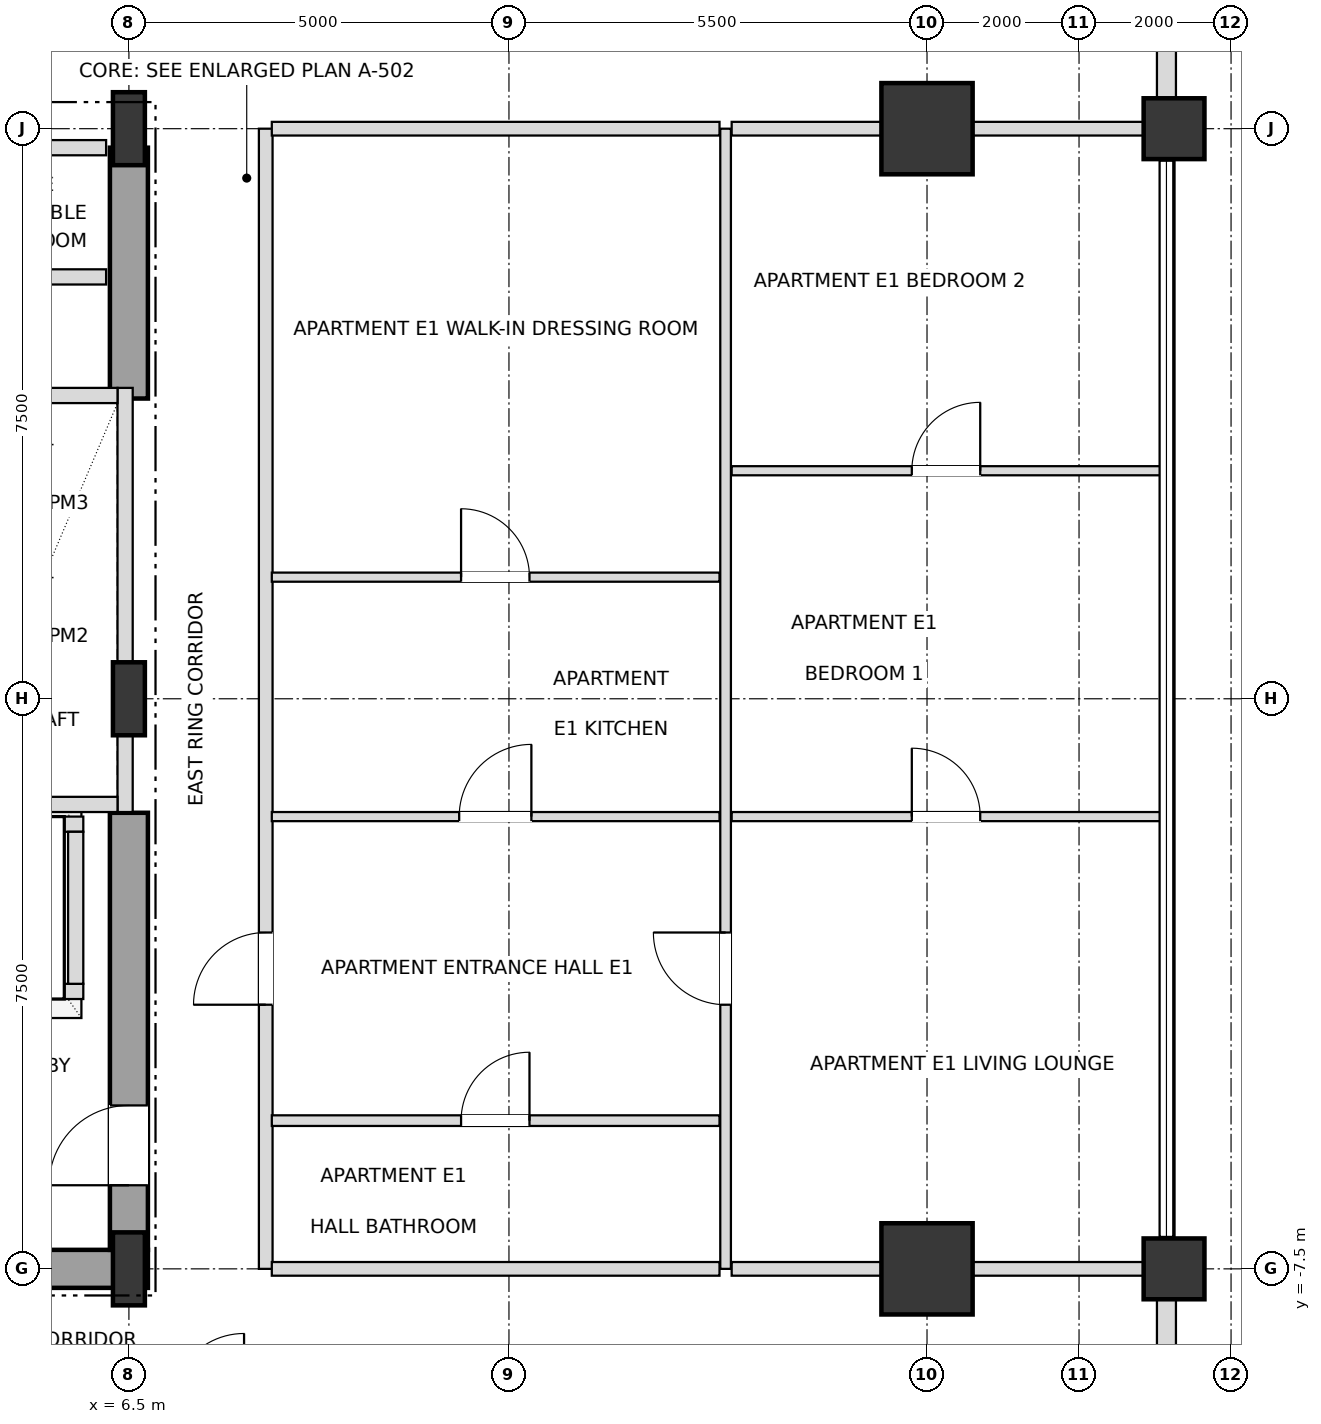
"""IFC4 building model, lengths in metres.
Left out: names, types, materials, properties, quantities, classifications, styles, units other than length and angle.
Written with IfcOpenShell. Run it as: python <this file> out.ifc"""

import sys

from ifc_helpers import new_model, si_unit, direction, frame, frame_2d, origin, origin_2d, place, context, subcontext, project, spatial, rectangle, i_section, extrude, element, fill, save


model = new_model("IFC4")
c1 = context("Model", 3, precision=1e-05, world=origin(), true_north=direction((0.0, 1.0)))
c2 = subcontext(c1, "Body", "Model", "MODEL_VIEW")
j1 = project(units=[si_unit("LENGTHUNIT", "METRE"), si_unit("PLANEANGLEUNIT", "RADIAN")], contexts=[c1])
p1 = place(None, origin())
s1 = spatial("IfcSite", under=j1, at=p1, CompositionType="ELEMENT")
p2 = place(p1, origin())
s2 = spatial("IfcBuilding", under=s1, at=p2, CompositionType="ELEMENT")
p3 = place(p2, frame((0.0, 0.0, 102.6)))
s3 = spatial("IfcBuildingStorey", under=s2, at=p3, CompositionType="ELEMENT", Elevation=102.6)
for number, where, z_axis, x_axis in (
    (1, (6.5, -7.5, 0.0), (0.0, 0.0, 1.0), (1.0, 0.0, 0.0)),
    (2, (6.5, 0.0, 0.0), (0.0, 0.0, 1.0), (1.0, 0.0, 0.0)),
    (3, (6.5, 7.5, 0.0), (0.0, 0.0, 1.0), (1.0, 0.0, 0.0)),
):
    element("IfcColumn", number, at=place(p3, frame(where, z_axis=z_axis, x_axis=x_axis)), inside=s3, PredefinedType="COLUMN", context=c2, shape_type="SweptSolid", body=[
        extrude(i_section(OverallWidth=0.42, OverallDepth=0.96, WebThickness=0.022, FlangeThickness=0.034, at=origin_2d()), origin(), (0.0, 0.0, 1.0), 3.6),
    ])
for number, where, z_axis, x_axis in (
    (4, (17.0, -7.5, 0.0), (0.0, 0.0, 1.0), (1.0, 0.0, 0.0)),
    (5, (17.0, 7.5, 0.0), (0.0, 0.0, 1.0), (1.0, 0.0, 0.0)),
):
    element("IfcColumn", number, at=place(p3, frame(where, z_axis=z_axis, x_axis=x_axis)), inside=s3, PredefinedType="USERDEFINED", context=c2, shape_type="SweptSolid", body=[
        extrude(rectangle(XDim=1.2, YDim=1.2, at=origin_2d()), origin(), (0.0, 0.0, 1.0), 3.6),
    ])
for number, where, z_axis, x_axis in (
    (6, (20.25, -7.5, 0.0), (0.0, 0.0, 1.0), (1.0, 0.0, 0.0)),
    (7, (20.25, 7.5, 0.0), (0.0, 0.0, 1.0), (1.0, 0.0, 0.0)),
):
    element("IfcColumn", number, at=place(p3, frame(where, z_axis=z_axis, x_axis=x_axis)), inside=s3, PredefinedType="COLUMN", context=c2, shape_type="SweptSolid", body=[
        extrude(rectangle(XDim=0.8, YDim=0.8, at=origin_2d()), origin(), (0.0, 0.0, 1.0), 3.6),
    ])
p4 = place(p3, frame((20.15, -12.605, 0.0), z_axis=(0.0, 0.0, 1.0), x_axis=(0.0, 1.0, 0.0)))
e8 = element("IfcWall", 8, at=p4, inside=s3, PredefinedType="SOLIDWALL", context=c2, shape_type="SweptSolid", body=[
    extrude(rectangle(XDim=4.71, YDim=0.25, at=frame_2d((2.355, 0.0))), origin(), (0.0, 0.0, 1.0), 2.736),
])
p5 = place(p4, frame((1.455, 0.0, 0.72)))
e9 = element("IfcOpeningElement", 9, at=p5, cuts=e8, PredefinedType="OPENING", context=c2, shape_type="SweptSolid", body=[
    extrude(rectangle(XDim=1.8, YDim=1.68, at=frame_2d((0.9, 0.84))), frame((0.0, 0.135, 0.0), z_axis=(0.0, -1.0, 0.0), x_axis=(1.0, 0.0, 0.0)), (0.0, 0.0, 1.0), 0.27),
])
p6 = place(p3, frame((20.15, 7.895, 0.0), z_axis=(0.0, 0.0, 1.0), x_axis=(0.0, 1.0, 0.0)))
e10 = element("IfcWall", 10, at=p6, inside=s3, PredefinedType="SOLIDWALL", context=c2, shape_type="SweptSolid", body=[
    extrude(rectangle(XDim=4.71, YDim=0.25, at=frame_2d((2.355, 0.0))), origin(), (0.0, 0.0, 1.0), 2.736),
])
p7 = place(p6, frame((1.455, 0.0, 0.72)))
e11 = element("IfcOpeningElement", 11, at=p7, cuts=e10, PredefinedType="OPENING", context=c2, shape_type="SweptSolid", body=[
    extrude(rectangle(XDim=1.8, YDim=1.68, at=frame_2d((0.9, 0.84))), frame((0.0, 0.135, 0.0), z_axis=(0.0, -1.0, 0.0), x_axis=(1.0, 0.0, 0.0)), (0.0, 0.0, 1.0), 0.27),
])
p8 = place(p3, frame((0.0, -7.5, 0.0), z_axis=(0.0, 0.0, 1.0), x_axis=(1.0, 0.0, 0.0)))
e12 = element("IfcWall", 12, at=p8, inside=s3, PredefinedType="SHEAR", context=c2, shape_type="SweptSolid", body=[
    extrude(rectangle(XDim=6.75, YDim=0.5, at=frame_2d((3.375, 0.0))), origin(), (0.0, 0.0, 1.0), 3.38),
])
p9 = place(p3, frame((6.5, -7.25, 0.0), z_axis=(0.0, 0.0, 1.0), x_axis=(0.0, 1.0, 0.0)))
e13 = element("IfcWall", 13, at=p9, inside=s3, PredefinedType="SHEAR", context=c2, shape_type="SweptSolid", body=[
    extrude(rectangle(XDim=5.75, YDim=0.5, at=frame_2d((2.875, 0.0))), origin(), (0.0, 0.0, 1.0), 3.38),
])
p10 = place(p9, frame((0.85, 0.0, 0.0)))
e14 = element("IfcOpeningElement", 14, at=p10, cuts=e13, PredefinedType="OPENING", context=c2, shape_type="SweptSolid", body=[
    extrude(rectangle(XDim=1.05, YDim=2.15, at=frame_2d((0.525, 1.075))), frame((0.0, 0.26, 0.0), z_axis=(0.0, -1.0, 0.0), x_axis=(1.0, 0.0, 0.0)), (0.0, 0.0, 1.0), 0.52),
])
p11 = place(p3, frame((6.5, 3.95, 0.0), z_axis=(0.0, 0.0, 1.0), x_axis=(0.0, 1.0, 0.0)))
e15 = element("IfcWall", 15, at=p11, inside=s3, PredefinedType="SHEAR", context=c2, shape_type="SweptSolid", body=[
    extrude(rectangle(XDim=3.3, YDim=0.5, at=frame_2d((1.65, 0.0))), origin(), (0.0, 0.0, 1.0), 3.38),
])
p12 = place(p3, frame((6.45, -1.49, 0.0), z_axis=(0.0, 0.0, 1.0), x_axis=(0.0, 1.0, 0.0)))
e16 = element("IfcWall", 16, at=p12, inside=s3, PredefinedType="SOLIDWALL", context=c2, shape_type="SweptSolid", body=[
    extrude(rectangle(XDim=5.58, YDim=0.2, at=frame_2d((2.79, 0.0))), origin(), (0.0, 0.0, 1.0), 2.816),
])
for number, where, z_axis, x_axis in (
    (17, (4.15, -1.39, 0.0), (0.0, 0.0, 1.0), (1.0, 0.0, 0.0)),
    (18, (4.15, 3.99, 0.0), (0.0, 0.0, 1.0), (1.0, 0.0, 0.0)),
):
    element("IfcWall", number, at=place(p3, frame(where, z_axis=z_axis, x_axis=x_axis)), inside=s3, PredefinedType="SOLIDWALL", context=c2, shape_type="SweptSolid", body=[
        extrude(rectangle(XDim=2.2, YDim=0.2, at=frame_2d((1.1, 0.0))), origin(), (0.0, 0.0, 1.0), 3.38),
    ])
p13 = place(p3, frame((1.8, -3.85, 0.0), z_axis=(0.0, 0.0, 1.0), x_axis=(1.0, 0.0, 0.0)))
e19 = element("IfcWall", 19, at=p13, inside=s3, PredefinedType="SOLIDWALL", context=c2, shape_type="SweptSolid", body=[
    extrude(rectangle(XDim=4.1, YDim=0.2, at=frame_2d((2.05, 0.0))), origin(), (0.0, 0.0, 1.0), 3.38),
])
p14 = place(p13, frame((0.45, 0.0, 0.0)))
e20 = element("IfcOpeningElement", 20, at=p14, cuts=e19, PredefinedType="OPENING", context=c2, shape_type="SweptSolid", body=[
    extrude(rectangle(XDim=1.2, YDim=2.2, at=frame_2d((0.6, 1.1))), frame((0.0, 0.11, 0.0), z_axis=(0.0, -1.0, 0.0), x_axis=(1.0, 0.0, 0.0)), (0.0, 0.0, 1.0), 0.22),
])
p15 = place(p13, frame((2.45, 0.0, 0.0)))
e21 = element("IfcOpeningElement", 21, at=p15, cuts=e19, PredefinedType="OPENING", context=c2, shape_type="SweptSolid", body=[
    extrude(rectangle(XDim=1.2, YDim=2.2, at=frame_2d((0.6, 1.1))), frame((0.0, 0.11, 0.0), z_axis=(0.0, -1.0, 0.0), x_axis=(1.0, 0.0, 0.0)), (0.0, 0.0, 1.0), 0.22),
])
p16 = place(p3, frame((1.8, -1.65, 0.0), z_axis=(0.0, 0.0, 1.0), x_axis=(1.0, 0.0, 0.0)))
e22 = element("IfcWall", 22, at=p16, inside=s3, PredefinedType="SOLIDWALL", context=c2, shape_type="SweptSolid", body=[
    extrude(rectangle(XDim=4.1, YDim=0.2, at=frame_2d((2.05, 0.0))), origin(), (0.0, 0.0, 1.0), 3.38),
])
p17 = place(p3, frame((5.8, -3.75, 0.0), z_axis=(0.0, 0.0, 1.0), x_axis=(0.0, 1.0, 0.0)))
e23 = element("IfcWall", 23, at=p17, inside=s3, PredefinedType="SOLIDWALL", context=c2, shape_type="SweptSolid", body=[
    extrude(rectangle(XDim=2.0, YDim=0.2, at=frame_2d((1.0, 0.0))), origin(), (0.0, 0.0, 1.0), 3.38),
])
p18 = place(p3, frame((8.3, -7.5, 0.0), z_axis=(0.0, 0.0, 1.0), x_axis=(0.0, 1.0, 0.0)))
e24 = element("IfcWall", 24, at=p18, inside=s3, PredefinedType="PARTITIONING", context=c2, shape_type="SweptSolid", body=[
    extrude(rectangle(XDim=15.0, YDim=0.18, at=frame_2d((7.5, 0.0))), origin(), (0.0, 0.0, 1.0), 3.38),
])
p19 = place(p18, frame((3.475, 0.0, 0.0)))
e25 = element("IfcOpeningElement", 25, at=p19, cuts=e24, PredefinedType="OPENING", context=c2, shape_type="SweptSolid", body=[
    extrude(rectangle(XDim=0.95, YDim=2.15, at=frame_2d((0.475, 1.075))), frame((0.0, 0.1, 0.0), z_axis=(0.0, -1.0, 0.0), x_axis=(1.0, 0.0, 0.0)), (0.0, 0.0, 1.0), 0.2),
])
p20 = place(p3, frame((14.35, -7.5, 0.0), z_axis=(0.0, 0.0, 1.0), x_axis=(0.0, 1.0, 0.0)))
e26 = element("IfcWall", 26, at=p20, inside=s3, PredefinedType="PARTITIONING", context=c2, shape_type="SweptSolid", body=[
    extrude(rectangle(XDim=15.0, YDim=0.14, at=frame_2d((7.5, 0.0))), origin(), (0.0, 0.0, 1.0), 3.38),
])
p21 = place(p20, frame((3.475, 0.0, 0.0)))
e27 = element("IfcOpeningElement", 27, at=p21, cuts=e26, PredefinedType="OPENING", context=c2, shape_type="SweptSolid", body=[
    extrude(rectangle(XDim=0.95, YDim=2.1, at=frame_2d((0.475, 1.05))), frame((0.0, 0.08, 0.0), z_axis=(0.0, -1.0, 0.0), x_axis=(1.0, 0.0, 0.0)), (0.0, 0.0, 1.0), 0.16),
])
p22 = place(p3, frame((8.38, -7.5, 0.0), z_axis=(0.0, 0.0, 1.0), x_axis=(1.0, 0.0, 0.0)))
e28 = element("IfcWall", 28, at=p22, inside=s3, PredefinedType="PARTITIONING", context=c2, shape_type="SweptSolid", body=[
    extrude(rectangle(XDim=5.89, YDim=0.18, at=frame_2d((2.945, 0.0))), origin(), (0.0, 0.0, 1.0), 2.816),
])
p23 = place(p3, frame((14.43, -7.5, 0.0), z_axis=(0.0, 0.0, 1.0), x_axis=(1.0, 0.0, 0.0)))
e29 = element("IfcWall", 29, at=p23, inside=s3, PredefinedType="PARTITIONING", context=c2, shape_type="SweptSolid", body=[
    extrude(rectangle(XDim=5.72, YDim=0.18, at=frame_2d((2.86, 0.0))), origin(), (0.0, 0.0, 1.0), 2.816),
])
p24 = place(p3, frame((8.38, -5.55, 0.0), z_axis=(0.0, 0.0, 1.0), x_axis=(1.0, 0.0, 0.0)))
e30 = element("IfcWall", 30, at=p24, inside=s3, PredefinedType="PARTITIONING", context=c2, shape_type="SweptSolid", body=[
    extrude(rectangle(XDim=5.89, YDim=0.14, at=frame_2d((2.945, 0.0))), origin(), (0.0, 0.0, 1.0), 3.38),
])
p25 = place(p24, frame((2.49, 0.0, 0.0)))
e31 = element("IfcOpeningElement", 31, at=p25, cuts=e30, PredefinedType="OPENING", context=c2, shape_type="SweptSolid", body=[
    extrude(rectangle(XDim=0.9, YDim=2.1, at=frame_2d((0.45, 1.05))), frame((0.0, 0.08, 0.0), z_axis=(0.0, -1.0, 0.0), x_axis=(1.0, 0.0, 0.0)), (0.0, 0.0, 1.0), 0.16),
])
p26 = place(p3, frame((8.38, -1.55, 0.0), z_axis=(0.0, 0.0, 1.0), x_axis=(1.0, 0.0, 0.0)))
e32 = element("IfcWall", 32, at=p26, inside=s3, PredefinedType="PARTITIONING", context=c2, shape_type="SweptSolid", body=[
    extrude(rectangle(XDim=5.89, YDim=0.12, at=frame_2d((2.945, 0.0))), origin(), (0.0, 0.0, 1.0), 3.38),
])
p27 = place(p26, frame((2.465, 0.0, 0.0)))
e33 = element("IfcOpeningElement", 33, at=p27, cuts=e32, PredefinedType="OPENING", context=c2, shape_type="SweptSolid", body=[
    extrude(rectangle(XDim=0.95, YDim=2.1, at=frame_2d((0.475, 1.05))), frame((0.0, 0.07, 0.0), z_axis=(0.0, -1.0, 0.0), x_axis=(1.0, 0.0, 0.0)), (0.0, 0.0, 1.0), 0.14),
])
p28 = place(p3, frame((14.43, -1.55, 0.0), z_axis=(0.0, 0.0, 1.0), x_axis=(1.0, 0.0, 0.0)))
e34 = element("IfcWall", 34, at=p28, inside=s3, PredefinedType="PARTITIONING", context=c2, shape_type="SweptSolid", body=[
    extrude(rectangle(XDim=5.64, YDim=0.12, at=frame_2d((2.82, 0.0))), origin(), (0.0, 0.0, 1.0), 2.816),
])
p29 = place(p28, frame((2.37, 0.0, 0.0)))
e35 = element("IfcOpeningElement", 35, at=p29, cuts=e34, PredefinedType="OPENING", context=c2, shape_type="SweptSolid", body=[
    extrude(rectangle(XDim=0.9, YDim=2.1, at=frame_2d((0.45, 1.05))), frame((0.0, 0.07, 0.0), z_axis=(0.0, -1.0, 0.0), x_axis=(1.0, 0.0, 0.0)), (0.0, 0.0, 1.0), 0.14),
])
p30 = place(p3, frame((8.38, 1.6, 0.0), z_axis=(0.0, 0.0, 1.0), x_axis=(1.0, 0.0, 0.0)))
e36 = element("IfcWall", 36, at=p30, inside=s3, PredefinedType="PARTITIONING", context=c2, shape_type="SweptSolid", body=[
    extrude(rectangle(XDim=5.89, YDim=0.12, at=frame_2d((2.945, 0.0))), origin(), (0.0, 0.0, 1.0), 3.38),
])
p31 = place(p30, frame((2.49, 0.0, 0.0)))
e37 = element("IfcOpeningElement", 37, at=p31, cuts=e36, PredefinedType="OPENING", context=c2, shape_type="SweptSolid", body=[
    extrude(rectangle(XDim=0.9, YDim=2.1, at=frame_2d((0.45, 1.05))), frame((0.0, 0.07, 0.0), z_axis=(0.0, -1.0, 0.0), x_axis=(1.0, 0.0, 0.0)), (0.0, 0.0, 1.0), 0.14),
])
p32 = place(p3, frame((14.43, 3.0, 0.0), z_axis=(0.0, 0.0, 1.0), x_axis=(1.0, 0.0, 0.0)))
e38 = element("IfcWall", 38, at=p32, inside=s3, PredefinedType="PARTITIONING", context=c2, shape_type="SweptSolid", body=[
    extrude(rectangle(XDim=5.64, YDim=0.12, at=frame_2d((2.82, 0.0))), origin(), (0.0, 0.0, 1.0), 2.816),
])
p33 = place(p32, frame((2.37, 0.0, 0.0)))
e39 = element("IfcOpeningElement", 39, at=p33, cuts=e38, PredefinedType="OPENING", context=c2, shape_type="SweptSolid", body=[
    extrude(rectangle(XDim=0.9, YDim=2.1, at=frame_2d((0.45, 1.05))), frame((0.0, 0.07, 0.0), z_axis=(0.0, -1.0, 0.0), x_axis=(1.0, 0.0, 0.0)), (0.0, 0.0, 1.0), 0.14),
])
for number, where, z_axis, x_axis in (
    (40, (4.13, 5.55, 0.0), (0.0, 0.0, 1.0), (1.0, 0.0, 0.0)),
    (41, (4.13, 7.25, 0.0), (0.0, 0.0, 1.0), (1.0, 0.0, 0.0)),
):
    element("IfcWall", number, at=place(p3, frame(where, z_axis=z_axis, x_axis=x_axis)), inside=s3, PredefinedType="SOLIDWALL", context=c2, shape_type="SweptSolid", body=[
        extrude(rectangle(XDim=2.07, YDim=0.2, at=frame_2d((1.035, 0.0))), origin(), (0.0, 0.0, 1.0), 3.38),
    ])
p34 = place(p3, frame((8.38, 7.5, 0.0), z_axis=(0.0, 0.0, 1.0), x_axis=(1.0, 0.0, 0.0)))
e42 = element("IfcWall", 42, at=p34, inside=s3, PredefinedType="PARTITIONING", context=c2, shape_type="SweptSolid", body=[
    extrude(rectangle(XDim=5.89, YDim=0.18, at=frame_2d((2.945, 0.0))), origin(), (0.0, 0.0, 1.0), 2.816),
])
p35 = place(p3, frame((14.43, 7.5, 0.0), z_axis=(0.0, 0.0, 1.0), x_axis=(1.0, 0.0, 0.0)))
e43 = element("IfcWall", 43, at=p35, inside=s3, PredefinedType="PARTITIONING", context=c2, shape_type="SweptSolid", body=[
    extrude(rectangle(XDim=5.72, YDim=0.18, at=frame_2d((2.86, 0.0))), origin(), (0.0, 0.0, 1.0), 2.816),
])
p36 = place(p10, origin())
e44 = element("IfcDoor", 44, at=p36, inside=s3, OperationType="SINGLE_SWING_LEFT", PredefinedType="DOOR", context=c2, shape_type="SweptSolid", body=[
    extrude(rectangle(XDim=1.05, YDim=2.15, at=frame_2d((0.525, 1.075))), frame((0.0, 0.025, 0.0), z_axis=(0.0, -1.0, 0.0), x_axis=(1.0, 0.0, 0.0)), (0.0, 0.0, 1.0), 0.05),
])
fill(e14, e44)
p37 = place(p25, origin())
e45 = element("IfcDoor", 45, at=p37, inside=s3, OperationType="SINGLE_SWING_RIGHT", PredefinedType="DOOR", context=c2, shape_type="SweptSolid", body=[
    extrude(rectangle(XDim=0.9, YDim=2.1, at=frame_2d((0.45, 1.05))), frame((0.0, 0.025, 0.0), z_axis=(0.0, -1.0, 0.0), x_axis=(1.0, 0.0, 0.0)), (0.0, 0.0, 1.0), 0.05),
])
fill(e31, e45)
p38 = place(p19, origin())
e46 = element("IfcDoor", 46, at=p38, inside=s3, OperationType="SINGLE_SWING_LEFT", PredefinedType="DOOR", context=c2, shape_type="SweptSolid", body=[
    extrude(rectangle(XDim=0.95, YDim=2.15, at=frame_2d((0.475, 1.075))), frame((0.0, 0.025, 0.0), z_axis=(0.0, -1.0, 0.0), x_axis=(1.0, 0.0, 0.0)), (0.0, 0.0, 1.0), 0.05),
])
fill(e25, e46)
p39 = place(p27, origin())
e47 = element("IfcDoor", 47, at=p39, inside=s3, OperationType="SINGLE_SWING_RIGHT", PredefinedType="DOOR", context=c2, shape_type="SweptSolid", body=[
    extrude(rectangle(XDim=0.95, YDim=2.1, at=frame_2d((0.475, 1.05))), frame((0.0, 0.025, 0.0), z_axis=(0.0, -1.0, 0.0), x_axis=(1.0, 0.0, 0.0)), (0.0, 0.0, 1.0), 0.05),
])
fill(e33, e47)
p40 = place(p31, origin())
e48 = element("IfcDoor", 48, at=p40, inside=s3, OperationType="SINGLE_SWING_LEFT", PredefinedType="DOOR", context=c2, shape_type="SweptSolid", body=[
    extrude(rectangle(XDim=0.9, YDim=2.1, at=frame_2d((0.45, 1.05))), frame((0.0, 0.025, 0.0), z_axis=(0.0, -1.0, 0.0), x_axis=(1.0, 0.0, 0.0)), (0.0, 0.0, 1.0), 0.05),
])
fill(e37, e48)
p41 = place(p21, origin())
e49 = element("IfcDoor", 49, at=p41, inside=s3, OperationType="SINGLE_SWING_RIGHT", PredefinedType="DOOR", context=c2, shape_type="SweptSolid", body=[
    extrude(rectangle(XDim=0.95, YDim=2.1, at=frame_2d((0.475, 1.05))), frame((0.0, 0.025, 0.0), z_axis=(0.0, -1.0, 0.0), x_axis=(1.0, 0.0, 0.0)), (0.0, 0.0, 1.0), 0.05),
])
fill(e27, e49)
p42 = place(p29, origin())
e50 = element("IfcDoor", 50, at=p42, inside=s3, OperationType="SINGLE_SWING_LEFT", PredefinedType="DOOR", context=c2, shape_type="SweptSolid", body=[
    extrude(rectangle(XDim=0.9, YDim=2.1, at=frame_2d((0.45, 1.05))), frame((0.0, 0.025, 0.0), z_axis=(0.0, -1.0, 0.0), x_axis=(1.0, 0.0, 0.0)), (0.0, 0.0, 1.0), 0.05),
])
fill(e35, e50)
p43 = place(p33, origin())
e51 = element("IfcDoor", 51, at=p43, inside=s3, OperationType="SINGLE_SWING_RIGHT", PredefinedType="DOOR", context=c2, shape_type="SweptSolid", body=[
    extrude(rectangle(XDim=0.9, YDim=2.1, at=frame_2d((0.45, 1.05))), frame((0.0, 0.025, 0.0), z_axis=(0.0, -1.0, 0.0), x_axis=(1.0, 0.0, 0.0)), (0.0, 0.0, 1.0), 0.05),
])
fill(e39, e51)
save(model, sys.argv[1])
